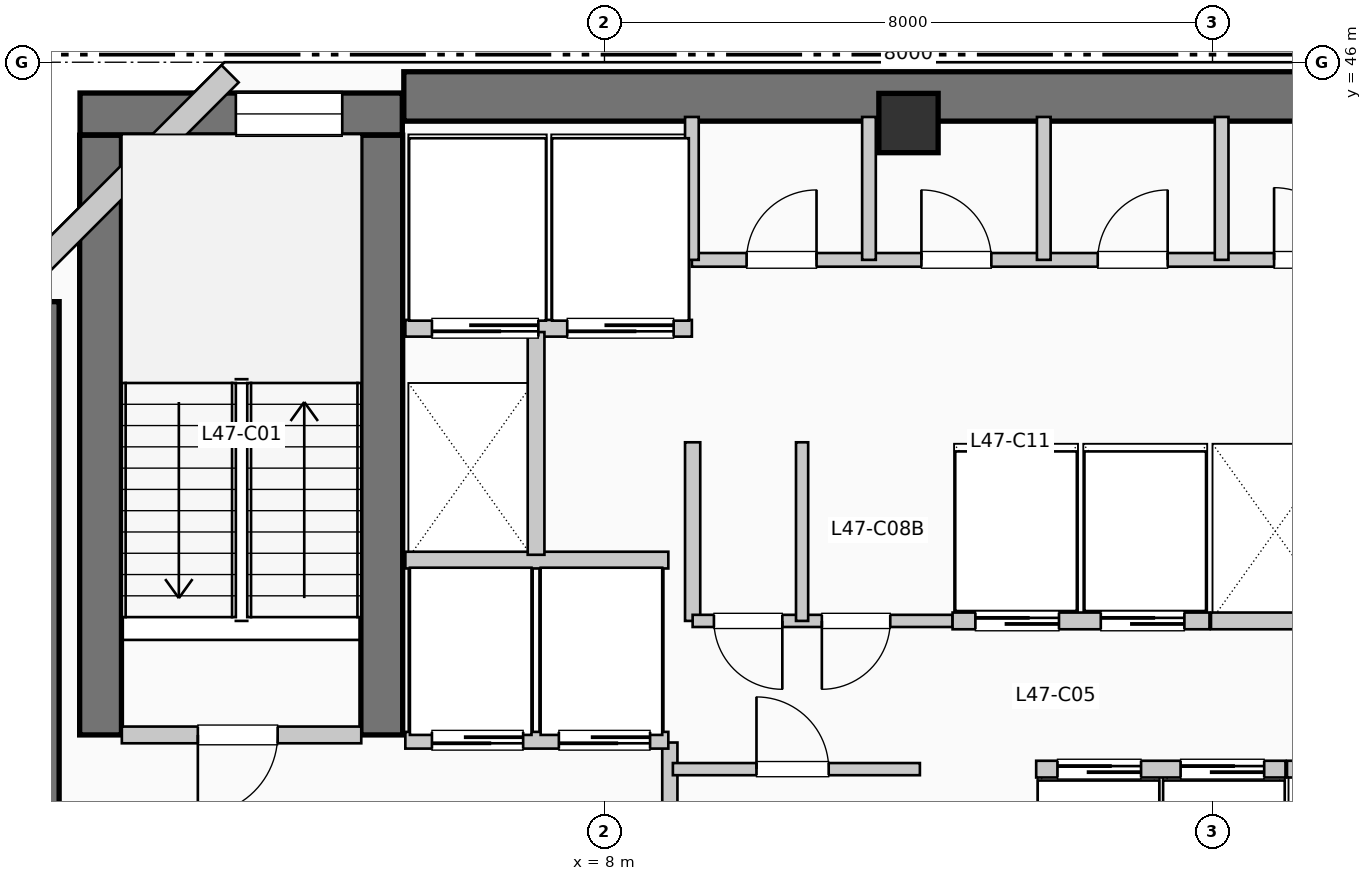
"""IFC4 building model, lengths in metres.
Left out: names, types, materials, properties, quantities, classifications, styles, units other than length and angle.
Written with IfcOpenShell. Run it as: python <this file> out.ifc"""

import sys

from ifc_helpers import new_model, si_unit, direction, frame, frame_2d, origin, origin_2d, place, context, subcontext, project, spatial, rectangle, extrude, element, fill, save


model = new_model("IFC4")
c1 = context("Model", 3, precision=1e-05, world=origin(), true_north=direction((0.0, 1.0)))
c2 = subcontext(c1, "Body", "Model", "MODEL_VIEW")
j1 = project(units=[si_unit("LENGTHUNIT", "METRE"), si_unit("PLANEANGLEUNIT", "RADIAN")], contexts=[c1])
p1 = place(None, origin())
s1 = spatial("IfcSite", under=j1, at=p1, CompositionType="ELEMENT")
p2 = place(p1, origin())
s2 = spatial("IfcBuilding", under=s1, at=p2, CompositionType="ELEMENT")
p3 = place(p2, frame((0.0, 0.0, 195.36)))
s3 = spatial("IfcBuildingStorey", under=s2, at=p3, CompositionType="ELEMENT", Elevation=195.36)
p4 = place(p3, frame((5.36, 45.55, 0.0), z_axis=(0.0, 0.0, 1.0), x_axis=(1.0, 0.0, 0.0)))
e1 = element("IfcWall", 1, at=p4, inside=s3, PredefinedType="SHEAR", context=c2, shape_type="SweptSolid", body=[
    extrude(rectangle(XDim=13.98, YDim=0.65, at=frame_2d((6.99, 0.0))), origin(), (0.0, 0.0, 1.0), 3.96),
])
p5 = place(p3, frame((0.5, 34.95, 0.0), z_axis=(0.0, 0.0, 1.0), x_axis=(0.0, 1.0, 0.0)))
e2 = element("IfcWall", 2, at=p5, inside=s3, PredefinedType="SHEAR", context=c2, shape_type="SweptSolid", body=[
    extrude(rectangle(XDim=7.9, YDim=0.65, at=frame_2d((3.95, 0.0))), origin(), (0.0, 0.0, 1.0), 3.96),
])
for number, where, z_axis, x_axis in (
    (3, (1.37, 37.15, 0.0), (0.0, 0.0, 1.0), (0.0, 1.0, 0.0)),
    (4, (5.07, 37.15, 0.0), (0.0, 0.0, 1.0), (0.0, 1.0, 0.0)),
):
    element("IfcWall", number, at=place(p3, frame(where, z_axis=z_axis, x_axis=x_axis)), inside=s3, PredefinedType="SHEAR", context=c2, shape_type="SweptSolid", body=[
        extrude(rectangle(XDim=7.89, YDim=0.55, at=frame_2d((3.945, 0.0))), origin(), (0.0, 0.0, 1.0), 3.96),
    ])
p6 = place(p3, frame((1.1, 45.32, 0.0), z_axis=(0.0, 0.0, 1.0), x_axis=(1.0, 0.0, 0.0)))
e5 = element("IfcWall", 5, at=p6, inside=s3, PredefinedType="SHEAR", context=c2, shape_type="SweptSolid", body=[
    extrude(rectangle(XDim=4.24, YDim=0.55, at=frame_2d((2.12, 0.0))), origin(), (0.0, 0.0, 1.0), 3.96),
])
p7 = place(p6, frame((2.05, 0.0, 1.05)))
e6 = element("IfcOpeningElement", 6, at=p7, cuts=e5, PredefinedType="OPENING", context=c2, shape_type="SweptSolid", body=[
    extrude(rectangle(XDim=1.4, YDim=1.8, at=frame_2d((0.7, 0.9))), frame((0.0, 0.285, 0.0), z_axis=(0.0, -1.0, 0.0), x_axis=(1.0, 0.0, 0.0)), (0.0, 0.0, 1.0), 0.57),
])
p8 = place(p3, frame((12.0, 45.2, 0.0), z_axis=(0.0, 0.0, 1.0), x_axis=(1.0, 0.0, 0.0)))
e7 = element("IfcColumn", 7, at=p8, inside=s3, PredefinedType="COLUMN", context=c2, shape_type="SweptSolid", body=[
    extrude(rectangle(XDim=0.78, YDim=0.78, at=origin_2d()), origin(), (0.0, 0.0, 1.0), 3.96),
])
p9 = place(p3, frame((3.074, 45.848, 0.0), z_axis=(0.0, 0.0, 1.0), x_axis=(-0.707106781187, -0.707106781187, 0.0)))
e8 = element("IfcWall", 8, at=p9, inside=s3, PredefinedType="SOLIDWALL", context=c2, shape_type="SweptSolid", body=[
    extrude(rectangle(XDim=4.133, YDim=0.32, at=frame_2d((2.066, 0.0))), origin(), (0.0, 0.0, 1.0), 3.71),
])
p10 = place(p3, frame((1.65, 37.15, 0.0), z_axis=(0.0, 0.0, 1.0), x_axis=(1.0, 0.0, 0.0)))
e9 = element("IfcWall", 9, at=p10, inside=s3, PredefinedType="PARTITIONING", context=c2, shape_type="SweptSolid", body=[
    extrude(rectangle(XDim=3.15, YDim=0.22, at=frame_2d((1.575, 0.0))), origin(), (0.0, 0.0, 1.0), 3.71),
])
p11 = place(p10, frame((2.05, 0.0, 0.0), z_axis=(0.0, 0.0, 1.0), x_axis=(-1.0, 0.0, 0.0)))
e10 = element("IfcOpeningElement", 10, at=p11, cuts=e9, PredefinedType="OPENING", context=c2, shape_type="SweptSolid", body=[
    extrude(rectangle(XDim=1.05, YDim=2.15, at=frame_2d((0.525, 1.075))), frame((0.0, 0.12, 0.0), z_axis=(0.0, -1.0, 0.0), x_axis=(1.0, 0.0, 0.0)), (0.0, 0.0, 1.0), 0.24),
])
p12 = place(p3, frame((8.86, 34.55, 0.0), z_axis=(0.0, 0.0, 1.0), x_axis=(0.0, 1.0, 0.0)))
e11 = element("IfcWall", 11, at=p12, inside=s3, PredefinedType="PARTITIONING", context=c2, shape_type="SweptSolid", body=[
    extrude(rectangle(XDim=2.5, YDim=0.2, at=frame_2d((1.25, 0.0))), origin(), (0.0, 0.0, 1.0), 3.71),
])
p13 = place(p3, frame((5.38, 37.08, 0.0), z_axis=(0.0, 0.0, 1.0), x_axis=(1.0, 0.0, 0.0)))
e12 = element("IfcWall", 12, at=p13, inside=s3, PredefinedType="PARTITIONING", context=c2, shape_type="SweptSolid", body=[
    extrude(rectangle(XDim=3.46, YDim=0.22, at=frame_2d((1.73, 0.0))), origin(), (0.0, 0.0, 1.0), 3.71),
])
p14 = place(p13, frame((1.55, 0.0, 0.0), z_axis=(0.0, 0.0, 1.0), x_axis=(-1.0, 0.0, 0.0)))
e13 = element("IfcOpeningElement", 13, at=p14, cuts=e12, PredefinedType="OPENING", context=c2, shape_type="SweptSolid", body=[
    extrude(rectangle(XDim=1.2, YDim=2.2, at=frame_2d((0.6, 1.1))), frame((0.0, 0.12, 0.0), z_axis=(0.0, -1.0, 0.0), x_axis=(1.0, 0.0, 0.0)), (0.0, 0.0, 1.0), 0.24),
])
p15 = place(p13, frame((3.22, 0.0, 0.0), z_axis=(0.0, 0.0, 1.0), x_axis=(-1.0, 0.0, 0.0)))
e14 = element("IfcOpeningElement", 14, at=p15, cuts=e12, PredefinedType="OPENING", context=c2, shape_type="SweptSolid", body=[
    extrude(rectangle(XDim=1.2, YDim=2.2, at=frame_2d((0.6, 1.1))), frame((0.0, 0.12, 0.0), z_axis=(0.0, -1.0, 0.0), x_axis=(1.0, 0.0, 0.0)), (0.0, 0.0, 1.0), 0.24),
])
p16 = place(p3, frame((5.38, 39.45, 0.0), z_axis=(0.0, 0.0, 1.0), x_axis=(1.0, 0.0, 0.0)))
e15 = element("IfcWall", 15, at=p16, inside=s3, PredefinedType="PARTITIONING", context=c2, shape_type="SweptSolid", body=[
    extrude(rectangle(XDim=3.46, YDim=0.22, at=frame_2d((1.73, 0.0))), origin(), (0.0, 0.0, 1.0), 3.71),
])
p17 = place(p3, frame((5.38, 42.5, 0.0), z_axis=(0.0, 0.0, 1.0), x_axis=(1.0, 0.0, 0.0)))
e16 = element("IfcWall", 16, at=p17, inside=s3, PredefinedType="PARTITIONING", context=c2, shape_type="SweptSolid", body=[
    extrude(rectangle(XDim=3.77, YDim=0.22, at=frame_2d((1.885, 0.0))), origin(), (0.0, 0.0, 1.0), 3.71),
])
p18 = place(p17, frame((1.75, 0.0, 0.0), z_axis=(0.0, 0.0, 1.0), x_axis=(-1.0, 0.0, 0.0)))
e17 = element("IfcOpeningElement", 17, at=p18, cuts=e16, PredefinedType="OPENING", context=c2, shape_type="SweptSolid", body=[
    extrude(rectangle(XDim=1.4, YDim=2.2, at=frame_2d((0.7, 1.1))), frame((0.0, 0.12, 0.0), z_axis=(0.0, -1.0, 0.0), x_axis=(1.0, 0.0, 0.0)), (0.0, 0.0, 1.0), 0.24),
])
p19 = place(p17, frame((3.53, 0.0, 0.0), z_axis=(0.0, 0.0, 1.0), x_axis=(-1.0, 0.0, 0.0)))
e18 = element("IfcOpeningElement", 18, at=p19, cuts=e16, PredefinedType="OPENING", context=c2, shape_type="SweptSolid", body=[
    extrude(rectangle(XDim=1.4, YDim=2.2, at=frame_2d((0.7, 1.1))), frame((0.0, 0.12, 0.0), z_axis=(0.0, -1.0, 0.0), x_axis=(1.0, 0.0, 0.0)), (0.0, 0.0, 1.0), 0.24),
])
p20 = place(p3, frame((7.1, 39.52, 0.0), z_axis=(0.0, 0.0, 1.0), x_axis=(0.0, 1.0, 0.0)))
e19 = element("IfcWall", 19, at=p20, inside=s3, PredefinedType="PARTITIONING", context=c2, shape_type="SweptSolid", body=[
    extrude(rectangle(XDim=2.93, YDim=0.22, at=frame_2d((1.465, 0.0))), origin(), (0.0, 0.0, 1.0), 3.71),
])
p21 = place(p3, frame((9.16, 38.65, 0.0), z_axis=(0.0, 0.0, 1.0), x_axis=(0.0, 1.0, 0.0)))
e20 = element("IfcWall", 20, at=p21, inside=s3, PredefinedType="PARTITIONING", context=c2, shape_type="SweptSolid", body=[
    extrude(rectangle(XDim=2.35, YDim=0.2, at=frame_2d((1.175, 0.0))), origin(), (0.0, 0.0, 1.0), 3.71),
])
p22 = place(p3, frame((8.9, 36.7, 0.0), z_axis=(0.0, 0.0, 1.0), x_axis=(1.0, 0.0, 0.0)))
e21 = element("IfcWall", 21, at=p22, inside=s3, PredefinedType="PARTITIONING", context=c2, shape_type="SweptSolid", body=[
    extrude(rectangle(XDim=3.25, YDim=0.16, at=frame_2d((1.625, 0.0))), origin(), (0.0, 0.0, 1.0), 3.71),
])
p23 = place(p22, frame((1.1, 0.0, 0.0)))
e22 = element("IfcOpeningElement", 22, at=p23, cuts=e21, PredefinedType="OPENING", context=c2, shape_type="SweptSolid", body=[
    extrude(rectangle(XDim=0.95, YDim=2.15, at=frame_2d((0.475, 1.075))), frame((0.0, 0.09, 0.0), z_axis=(0.0, -1.0, 0.0), x_axis=(1.0, 0.0, 0.0)), (0.0, 0.0, 1.0), 0.18),
])
p24 = place(p3, frame((9.16, 38.65, 0.0), z_axis=(0.0, 0.0, 1.0), x_axis=(1.0, 0.0, 0.0)))
e23 = element("IfcWall", 23, at=p24, inside=s3, PredefinedType="PARTITIONING", context=c2, shape_type="SweptSolid", body=[
    extrude(rectangle(XDim=3.42, YDim=0.16, at=frame_2d((1.71, 0.0))), origin(), (0.0, 0.0, 1.0), 3.71),
])
p25 = place(p24, frame((1.18, 0.0, 0.0), z_axis=(0.0, 0.0, 1.0), x_axis=(-1.0, 0.0, 0.0)))
e24 = element("IfcOpeningElement", 24, at=p25, cuts=e23, PredefinedType="OPENING", context=c2, shape_type="SweptSolid", body=[
    extrude(rectangle(XDim=0.9, YDim=2.15, at=frame_2d((0.45, 1.075))), frame((0.0, 0.09, 0.0), z_axis=(0.0, -1.0, 0.0), x_axis=(1.0, 0.0, 0.0)), (0.0, 0.0, 1.0), 0.18),
])
p26 = place(p24, frame((2.6, 0.0, 0.0), z_axis=(0.0, 0.0, 1.0), x_axis=(-1.0, 0.0, 0.0)))
e25 = element("IfcOpeningElement", 25, at=p26, cuts=e23, PredefinedType="OPENING", context=c2, shape_type="SweptSolid", body=[
    extrude(rectangle(XDim=0.9, YDim=2.15, at=frame_2d((0.45, 1.075))), frame((0.0, 0.09, 0.0), z_axis=(0.0, -1.0, 0.0), x_axis=(1.0, 0.0, 0.0)), (0.0, 0.0, 1.0), 0.18),
])
p27 = place(p3, frame((10.6, 38.65, 0.0), z_axis=(0.0, 0.0, 1.0), x_axis=(0.0, 1.0, 0.0)))
e26 = element("IfcWall", 26, at=p27, inside=s3, PredefinedType="PARTITIONING", context=c2, shape_type="SweptSolid", body=[
    extrude(rectangle(XDim=2.35, YDim=0.16, at=frame_2d((1.175, 0.0))), origin(), (0.0, 0.0, 1.0), 3.71),
])
p28 = place(p3, frame((13.68, 36.7, 0.0), z_axis=(0.0, 0.0, 1.0), x_axis=(1.0, 0.0, 0.0)))
e27 = element("IfcWall", 27, at=p28, inside=s3, PredefinedType="PARTITIONING", context=c2, shape_type="SweptSolid", body=[
    extrude(rectangle(XDim=3.28, YDim=0.22, at=frame_2d((1.64, 0.0))), origin(), (0.0, 0.0, 1.0), 3.71),
])
p29 = place(p28, frame((0.28, 0.0, 0.0)))
e28 = element("IfcOpeningElement", 28, at=p29, cuts=e27, PredefinedType="OPENING", context=c2, shape_type="SweptSolid", body=[
    extrude(rectangle(XDim=1.1, YDim=2.2, at=frame_2d((0.55, 1.1))), frame((0.0, 0.12, 0.0), z_axis=(0.0, -1.0, 0.0), x_axis=(1.0, 0.0, 0.0)), (0.0, 0.0, 1.0), 0.24),
])
p30 = place(p28, frame((1.9, 0.0, 0.0)))
e29 = element("IfcOpeningElement", 29, at=p30, cuts=e27, PredefinedType="OPENING", context=c2, shape_type="SweptSolid", body=[
    extrude(rectangle(XDim=1.1, YDim=2.2, at=frame_2d((0.55, 1.1))), frame((0.0, 0.12, 0.0), z_axis=(0.0, -1.0, 0.0), x_axis=(1.0, 0.0, 0.0)), (0.0, 0.0, 1.0), 0.24),
])
p31 = place(p3, frame((12.58, 38.65, 0.0), z_axis=(0.0, 0.0, 1.0), x_axis=(1.0, 0.0, 0.0)))
e30 = element("IfcWall", 30, at=p31, inside=s3, PredefinedType="PARTITIONING", context=c2, shape_type="SweptSolid", body=[
    extrude(rectangle(XDim=3.38, YDim=0.22, at=frame_2d((1.69, 0.0))), origin(), (0.0, 0.0, 1.0), 3.71),
])
p32 = place(p31, frame((0.3, 0.0, 0.0)))
e31 = element("IfcOpeningElement", 31, at=p32, cuts=e30, PredefinedType="OPENING", context=c2, shape_type="SweptSolid", body=[
    extrude(rectangle(XDim=1.1, YDim=2.2, at=frame_2d((0.55, 1.1))), frame((0.0, 0.12, 0.0), z_axis=(0.0, -1.0, 0.0), x_axis=(1.0, 0.0, 0.0)), (0.0, 0.0, 1.0), 0.24),
])
p33 = place(p31, frame((1.95, 0.0, 0.0)))
e32 = element("IfcOpeningElement", 32, at=p33, cuts=e30, PredefinedType="OPENING", context=c2, shape_type="SweptSolid", body=[
    extrude(rectangle(XDim=1.1, YDim=2.2, at=frame_2d((0.55, 1.1))), frame((0.0, 0.12, 0.0), z_axis=(0.0, -1.0, 0.0), x_axis=(1.0, 0.0, 0.0)), (0.0, 0.0, 1.0), 0.24),
])
p34 = place(p3, frame((16.98, 36.7, 0.0), z_axis=(0.0, 0.0, 1.0), x_axis=(1.0, 0.0, 0.0)))
e33 = element("IfcWall", 33, at=p34, inside=s3, PredefinedType="PARTITIONING", context=c2, shape_type="SweptSolid", body=[
    extrude(rectangle(XDim=1.7, YDim=0.22, at=frame_2d((0.85, 0.0))), origin(), (0.0, 0.0, 1.0), 3.71),
])
p35 = place(p3, frame((15.98, 38.65, 0.0), z_axis=(0.0, 0.0, 1.0), x_axis=(1.0, 0.0, 0.0)))
e34 = element("IfcWall", 34, at=p35, inside=s3, PredefinedType="PARTITIONING", context=c2, shape_type="SweptSolid", body=[
    extrude(rectangle(XDim=1.72, YDim=0.22, at=frame_2d((0.86, 0.0))), origin(), (0.0, 0.0, 1.0), 3.71),
])
p36 = place(p3, frame((9.15, 43.4, 0.0), z_axis=(0.0, 0.0, 1.0), x_axis=(1.0, 0.0, 0.0)))
e35 = element("IfcWall", 35, at=p36, inside=s3, PredefinedType="PLUMBINGWALL", context=c2, shape_type="SweptSolid", body=[
    extrude(rectangle(XDim=9.33, YDim=0.18, at=frame_2d((4.665, 0.0))), origin(), (0.0, 0.0, 1.0), 3.71),
])
p37 = place(p36, frame((0.72, 0.0, 0.0)))
e36 = element("IfcOpeningElement", 36, at=p37, cuts=e35, PredefinedType="OPENING", context=c2, shape_type="SweptSolid", body=[
    extrude(rectangle(XDim=0.92, YDim=2.1, at=frame_2d((0.46, 1.05))), frame((0.0, 0.1, 0.0), z_axis=(0.0, -1.0, 0.0), x_axis=(1.0, 0.0, 0.0)), (0.0, 0.0, 1.0), 0.2),
])
p38 = place(p36, frame((3.02, 0.0, 0.0)))
e37 = element("IfcOpeningElement", 37, at=p38, cuts=e35, PredefinedType="OPENING", context=c2, shape_type="SweptSolid", body=[
    extrude(rectangle(XDim=0.92, YDim=2.1, at=frame_2d((0.46, 1.05))), frame((0.0, 0.1, 0.0), z_axis=(0.0, -1.0, 0.0), x_axis=(1.0, 0.0, 0.0)), (0.0, 0.0, 1.0), 0.2),
])
p39 = place(p36, frame((5.34, 0.0, 0.0)))
e38 = element("IfcOpeningElement", 38, at=p39, cuts=e35, PredefinedType="OPENING", context=c2, shape_type="SweptSolid", body=[
    extrude(rectangle(XDim=0.92, YDim=2.1, at=frame_2d((0.46, 1.05))), frame((0.0, 0.1, 0.0), z_axis=(0.0, -1.0, 0.0), x_axis=(1.0, 0.0, 0.0)), (0.0, 0.0, 1.0), 0.2),
])
p40 = place(p36, frame((7.66, 0.0, 0.0)))
e39 = element("IfcOpeningElement", 39, at=p40, cuts=e35, PredefinedType="OPENING", context=c2, shape_type="SweptSolid", body=[
    extrude(rectangle(XDim=0.95, YDim=2.1, at=frame_2d((0.475, 1.05))), frame((0.0, 0.1, 0.0), z_axis=(0.0, -1.0, 0.0), x_axis=(1.0, 0.0, 0.0)), (0.0, 0.0, 1.0), 0.2),
])
for number, where, z_axis, x_axis in (
    (40, (9.15, 43.4, 0.0), (0.0, 0.0, 1.0), (0.0, 1.0, 0.0)),
    (41, (11.48, 43.4, 0.0), (0.0, 0.0, 1.0), (0.0, 1.0, 0.0)),
    (42, (13.78, 43.4, 0.0), (0.0, 0.0, 1.0), (0.0, 1.0, 0.0)),
    (43, (16.12, 43.4, 0.0), (0.0, 0.0, 1.0), (0.0, 1.0, 0.0)),
):
    element("IfcWall", number, at=place(p3, frame(where, z_axis=z_axis, x_axis=x_axis)), inside=s3, PredefinedType="PLUMBINGWALL", context=c2, shape_type="SweptSolid", body=[
        extrude(rectangle(XDim=1.88, YDim=0.18, at=frame_2d((0.94, 0.0))), origin(), (0.0, 0.0, 1.0), 3.71),
    ])
p41 = place(p7, origin())
e44 = element("IfcWindow", 44, at=p41, inside=s3, PartitioningType="SINGLE_PANEL", PredefinedType="WINDOW", context=c2, shape_type="SweptSolid", body=[
    extrude(rectangle(XDim=1.4, YDim=1.8, at=frame_2d((0.7, 0.9))), frame((0.0, 0.03, 0.0), z_axis=(0.0, -1.0, 0.0), x_axis=(1.0, 0.0, 0.0)), (0.0, 0.0, 1.0), 0.06),
])
fill(e6, e44)
p42 = place(p11, origin())
e45 = element("IfcDoor", 45, at=p42, inside=s3, OperationType="SINGLE_SWING_LEFT", PredefinedType="DOOR", context=c2, shape_type="SweptSolid", body=[
    extrude(rectangle(XDim=1.05, YDim=2.15, at=frame_2d((0.525, 1.075))), frame((0.0, 0.025, 0.0), z_axis=(0.0, -1.0, 0.0), x_axis=(1.0, 0.0, 0.0)), (0.0, 0.0, 1.0), 0.05),
])
fill(e10, e45)
p43 = place(p14, origin())
e46 = element("IfcDoor", 46, at=p43, inside=s3, OperationType="SLIDING_TO_RIGHT", PredefinedType="DOOR", context=c2, shape_type="SweptSolid", body=[
    extrude(rectangle(XDim=1.2, YDim=2.2, at=frame_2d((0.6, 1.1))), frame((0.0, 0.025, 0.0), z_axis=(0.0, -1.0, 0.0), x_axis=(1.0, 0.0, 0.0)), (0.0, 0.0, 1.0), 0.05),
])
fill(e13, e46)
p44 = place(p15, origin())
e47 = element("IfcDoor", 47, at=p44, inside=s3, OperationType="SLIDING_TO_RIGHT", PredefinedType="DOOR", context=c2, shape_type="SweptSolid", body=[
    extrude(rectangle(XDim=1.2, YDim=2.2, at=frame_2d((0.6, 1.1))), frame((0.0, 0.025, 0.0), z_axis=(0.0, -1.0, 0.0), x_axis=(1.0, 0.0, 0.0)), (0.0, 0.0, 1.0), 0.05),
])
fill(e14, e47)
p45 = place(p18, origin())
e48 = element("IfcDoor", 48, at=p45, inside=s3, OperationType="SLIDING_TO_LEFT", PredefinedType="DOOR", context=c2, shape_type="SweptSolid", body=[
    extrude(rectangle(XDim=1.4, YDim=2.2, at=frame_2d((0.7, 1.1))), frame((0.0, 0.025, 0.0), z_axis=(0.0, -1.0, 0.0), x_axis=(1.0, 0.0, 0.0)), (0.0, 0.0, 1.0), 0.05),
])
fill(e17, e48)
p46 = place(p19, origin())
e49 = element("IfcDoor", 49, at=p46, inside=s3, OperationType="SLIDING_TO_LEFT", PredefinedType="DOOR", context=c2, shape_type="SweptSolid", body=[
    extrude(rectangle(XDim=1.4, YDim=2.2, at=frame_2d((0.7, 1.1))), frame((0.0, 0.025, 0.0), z_axis=(0.0, -1.0, 0.0), x_axis=(1.0, 0.0, 0.0)), (0.0, 0.0, 1.0), 0.05),
])
fill(e18, e49)
p47 = place(p23, origin())
e50 = element("IfcDoor", 50, at=p47, inside=s3, OperationType="SINGLE_SWING_LEFT", PredefinedType="DOOR", context=c2, shape_type="SweptSolid", body=[
    extrude(rectangle(XDim=0.95, YDim=2.15, at=frame_2d((0.475, 1.075))), frame((0.0, 0.025, 0.0), z_axis=(0.0, -1.0, 0.0), x_axis=(1.0, 0.0, 0.0)), (0.0, 0.0, 1.0), 0.05),
])
fill(e22, e50)
p48 = place(p25, origin())
e51 = element("IfcDoor", 51, at=p48, inside=s3, OperationType="SINGLE_SWING_RIGHT", PredefinedType="DOOR", context=c2, shape_type="SweptSolid", body=[
    extrude(rectangle(XDim=0.9, YDim=2.15, at=frame_2d((0.45, 1.075))), frame((0.0, 0.025, 0.0), z_axis=(0.0, -1.0, 0.0), x_axis=(1.0, 0.0, 0.0)), (0.0, 0.0, 1.0), 0.05),
])
fill(e24, e51)
p49 = place(p26, origin())
e52 = element("IfcDoor", 52, at=p49, inside=s3, OperationType="SINGLE_SWING_LEFT", PredefinedType="DOOR", context=c2, shape_type="SweptSolid", body=[
    extrude(rectangle(XDim=0.9, YDim=2.15, at=frame_2d((0.45, 1.075))), frame((0.0, 0.025, 0.0), z_axis=(0.0, -1.0, 0.0), x_axis=(1.0, 0.0, 0.0)), (0.0, 0.0, 1.0), 0.05),
])
fill(e25, e52)
p50 = place(p29, origin())
e53 = element("IfcDoor", 53, at=p50, inside=s3, OperationType="SLIDING_TO_RIGHT", PredefinedType="DOOR", context=c2, shape_type="SweptSolid", body=[
    extrude(rectangle(XDim=1.1, YDim=2.2, at=frame_2d((0.55, 1.1))), frame((0.0, 0.025, 0.0), z_axis=(0.0, -1.0, 0.0), x_axis=(1.0, 0.0, 0.0)), (0.0, 0.0, 1.0), 0.05),
])
fill(e28, e53)
p51 = place(p30, origin())
e54 = element("IfcDoor", 54, at=p51, inside=s3, OperationType="SLIDING_TO_RIGHT", PredefinedType="DOOR", context=c2, shape_type="SweptSolid", body=[
    extrude(rectangle(XDim=1.1, YDim=2.2, at=frame_2d((0.55, 1.1))), frame((0.0, 0.025, 0.0), z_axis=(0.0, -1.0, 0.0), x_axis=(1.0, 0.0, 0.0)), (0.0, 0.0, 1.0), 0.05),
])
fill(e29, e54)
p52 = place(p32, origin())
e55 = element("IfcDoor", 55, at=p52, inside=s3, OperationType="SLIDING_TO_RIGHT", PredefinedType="DOOR", context=c2, shape_type="SweptSolid", body=[
    extrude(rectangle(XDim=1.1, YDim=2.2, at=frame_2d((0.55, 1.1))), frame((0.0, 0.025, 0.0), z_axis=(0.0, -1.0, 0.0), x_axis=(1.0, 0.0, 0.0)), (0.0, 0.0, 1.0), 0.05),
])
fill(e31, e55)
p53 = place(p33, origin())
e56 = element("IfcDoor", 56, at=p53, inside=s3, OperationType="SLIDING_TO_RIGHT", PredefinedType="DOOR", context=c2, shape_type="SweptSolid", body=[
    extrude(rectangle(XDim=1.1, YDim=2.2, at=frame_2d((0.55, 1.1))), frame((0.0, 0.025, 0.0), z_axis=(0.0, -1.0, 0.0), x_axis=(1.0, 0.0, 0.0)), (0.0, 0.0, 1.0), 0.05),
])
fill(e32, e56)
p54 = place(p37, origin())
e57 = element("IfcDoor", 57, at=p54, inside=s3, OperationType="SINGLE_SWING_RIGHT", PredefinedType="DOOR", context=c2, shape_type="SweptSolid", body=[
    extrude(rectangle(XDim=0.92, YDim=2.1, at=frame_2d((0.46, 1.05))), frame((0.0, 0.025, 0.0), z_axis=(0.0, -1.0, 0.0), x_axis=(1.0, 0.0, 0.0)), (0.0, 0.0, 1.0), 0.05),
])
fill(e36, e57)
p55 = place(p38, origin())
e58 = element("IfcDoor", 58, at=p55, inside=s3, OperationType="SINGLE_SWING_LEFT", PredefinedType="DOOR", context=c2, shape_type="SweptSolid", body=[
    extrude(rectangle(XDim=0.92, YDim=2.1, at=frame_2d((0.46, 1.05))), frame((0.0, 0.025, 0.0), z_axis=(0.0, -1.0, 0.0), x_axis=(1.0, 0.0, 0.0)), (0.0, 0.0, 1.0), 0.05),
])
fill(e37, e58)
p56 = place(p39, origin())
e59 = element("IfcDoor", 59, at=p56, inside=s3, OperationType="SINGLE_SWING_RIGHT", PredefinedType="DOOR", context=c2, shape_type="SweptSolid", body=[
    extrude(rectangle(XDim=0.92, YDim=2.1, at=frame_2d((0.46, 1.05))), frame((0.0, 0.025, 0.0), z_axis=(0.0, -1.0, 0.0), x_axis=(1.0, 0.0, 0.0)), (0.0, 0.0, 1.0), 0.05),
])
fill(e38, e59)
p57 = place(p40, origin())
e60 = element("IfcDoor", 60, at=p57, inside=s3, OperationType="SINGLE_SWING_LEFT", PredefinedType="DOOR", context=c2, shape_type="SweptSolid", body=[
    extrude(rectangle(XDim=0.95, YDim=2.1, at=frame_2d((0.475, 1.05))), frame((0.0, 0.025, 0.0), z_axis=(0.0, -1.0, 0.0), x_axis=(1.0, 0.0, 0.0)), (0.0, 0.0, 1.0), 0.05),
])
fill(e39, e60)
save(model, sys.argv[1])
